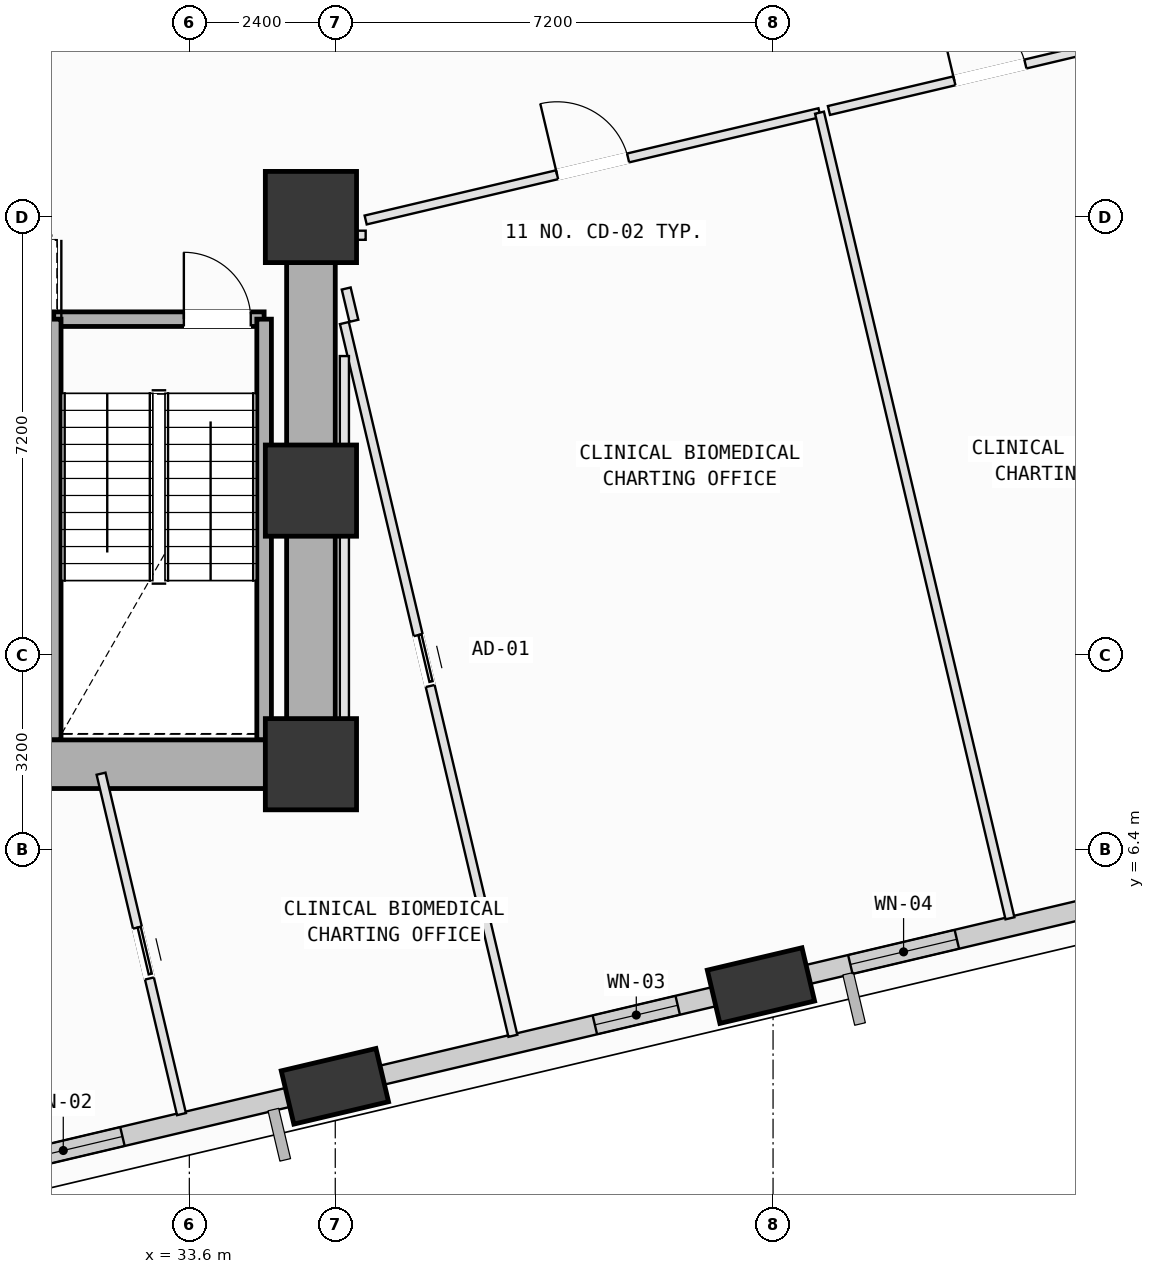
"""IFC4 building model, lengths in metres.
Left out: names, types, materials, properties, quantities, classifications, styles, units other than length and angle.
Written with IfcOpenShell. Run it as: python <this file> out.ifc"""

import sys

from ifc_helpers import new_model, si_unit, direction, frame, frame_2d, origin, origin_2d, place, context, subcontext, project, spatial, rectangle, extrude, element, fill, save


model = new_model("IFC4")
c1 = context("Model", 3, precision=1e-05, world=origin(), true_north=direction((0.0, 1.0)))
c2 = subcontext(c1, "Body", "Model", "MODEL_VIEW")
j1 = project(units=[si_unit("LENGTHUNIT", "METRE"), si_unit("PLANEANGLEUNIT", "RADIAN")], contexts=[c1])
p1 = place(None, origin())
s1 = spatial("IfcSite", under=j1, at=p1, CompositionType="ELEMENT")
p2 = place(p1, origin())
s2 = spatial("IfcBuilding", under=s1, at=p2, CompositionType="ELEMENT")
p3 = place(p2, frame((0.0, 0.0, 79.0)))
s3 = spatial("IfcBuildingStorey", under=s2, at=p3, CompositionType="ELEMENT", Elevation=79.0)
for number, where, z_axis, x_axis in (
    (1, (35.6, 7.8, 0.0), (0.0, 0.0, 1.0), (1.0, 0.0, 0.0)),
    (2, (35.6, 12.3, 0.0), (0.0, 0.0, 1.0), (1.0, 0.0, 0.0)),
    (3, (35.6, 16.8, 0.0), (0.0, 0.0, 1.0), (1.0, 0.0, 0.0)),
):
    element("IfcColumn", number, at=place(p3, frame(where, z_axis=z_axis, x_axis=x_axis)), inside=s3, PredefinedType="COLUMN", context=c2, shape_type="SweptSolid", body=[
        extrude(rectangle(XDim=1.5, YDim=1.5, at=origin_2d()), origin(), (0.0, 0.0, 1.0), 4.0),
    ])
p4 = place(p3, frame((35.994, 2.503, 0.002), z_axis=(0.091910802022, 0.010616963027, 0.995710642992), x_axis=(-0.339222831521, 0.940465222119, 0.021284655504)))
e4 = element("IfcColumn", 4, at=p4, inside=s3, PredefinedType="COLUMN", context=c2, shape_type="SweptSolid", body=[
    extrude(rectangle(XDim=1.6, YDim=0.9, at=origin_2d()), origin(), (0.0, 0.0, 1.0), 3.955),
])
p5 = place(p3, frame((43.001, 4.159, 0.002), z_axis=(0.084881179717, 0.039446599156, 0.995609939256), x_axis=(-0.617843296681, 0.786006368536, 0.021532518815)))
e5 = element("IfcColumn", 5, at=p5, inside=s3, PredefinedType="COLUMN", context=c2, shape_type="SweptSolid", body=[
    extrude(rectangle(XDim=1.6, YDim=0.9, at=origin_2d()), origin(), (0.0, 0.0, 1.0), 3.955),
])
p6 = place(p3, frame((35.582, 2.406, 0.0), z_axis=(0.0, 0.0, 1.0), x_axis=(-0.973170177917, -0.23008651593, 0.0)))
e6 = element("IfcWall", 6, at=p6, inside=s3, PredefinedType="SOLIDWALL", context=c2, shape_type="SweptSolid", body=[
    extrude(rectangle(XDim=5.99, YDim=0.32, at=frame_2d((2.995, 0.0))), origin(), (0.0, 0.0, 1.0), 3.085),
])
p7 = place(p6, frame((3.167, 0.0, 0.75)))
e7 = element("IfcOpeningElement", 7, at=p7, cuts=e6, PredefinedType="OPENING", context=c2, shape_type="SweptSolid", body=[
    extrude(rectangle(XDim=2.0, YDim=1.95, at=frame_2d((1.0, 0.975))), frame((0.0, 0.17, 0.0), z_axis=(0.0, -1.0, 0.0), x_axis=(1.0, 0.0, 0.0)), (0.0, 0.0, 1.0), 0.34),
])
p8 = place(p3, frame((42.589, 4.062, 0.0), z_axis=(0.0, 0.0, 1.0), x_axis=(-0.973176975218, -0.230057764281, 0.0)))
e8 = element("IfcWall", 8, at=p8, inside=s3, PredefinedType="SOLIDWALL", context=c2, shape_type="SweptSolid", body=[
    extrude(rectangle(XDim=5.985, YDim=0.32, at=frame_2d((2.993, 0.0))), origin(), (0.0, 0.0, 1.0), 3.085),
])
p9 = place(p8, frame((0.984, 0.0, 0.75)))
e9 = element("IfcOpeningElement", 9, at=p9, cuts=e8, PredefinedType="OPENING", context=c2, shape_type="SweptSolid", body=[
    extrude(rectangle(XDim=1.4, YDim=1.85, at=frame_2d((0.7, 0.925))), frame((0.0, 0.17, 0.0), z_axis=(0.0, -1.0, 0.0), x_axis=(1.0, 0.0, 0.0)), (0.0, 0.0, 1.0), 0.34),
])
p10 = place(p3, frame((49.602, 5.719, 0.0), z_axis=(0.0, 0.0, 1.0), x_axis=(-0.973177813983, -0.230054216157, 0.0)))
e10 = element("IfcWall", 10, at=p10, inside=s3, PredefinedType="SOLIDWALL", context=c2, shape_type="SweptSolid", body=[
    extrude(rectangle(XDim=5.993, YDim=0.32, at=frame_2d((2.996, 0.0))), origin(), (0.0, 0.0, 1.0), 3.085),
])
p11 = place(p10, frame((3.473, 0.0, 0.75)))
e11 = element("IfcOpeningElement", 11, at=p11, cuts=e10, PredefinedType="OPENING", context=c2, shape_type="SweptSolid", body=[
    extrude(rectangle(XDim=1.8, YDim=2.05, at=frame_2d((0.9, 1.025))), frame((0.0, 0.17, 0.0), z_axis=(0.0, -1.0, 0.0), x_axis=(1.0, 0.0, 0.0)), (0.0, 0.0, 1.0), 0.34),
])
p12 = place(p3, frame((31.37, 15.12, 0.0), z_axis=(0.0, 0.0, 1.0), x_axis=(1.0, 0.0, 0.0)))
e12 = element("IfcWall", 12, at=p12, inside=s3, PredefinedType="SOLIDWALL", context=c2, shape_type="SweptSolid", body=[
    extrude(rectangle(XDim=3.46, YDim=0.24, at=frame_2d((1.73, 0.0))), origin(), (0.0, 0.0, 1.0), 3.7),
])
p13 = place(p12, frame((2.14, 0.0, 0.0)))
e13 = element("IfcOpeningElement", 13, at=p13, cuts=e12, PredefinedType="OPENING", context=c2, shape_type="SweptSolid", body=[
    extrude(rectangle(XDim=1.1, YDim=2.15, at=frame_2d((0.55, 1.075))), frame((0.0, 0.13, 0.0), z_axis=(0.0, -1.0, 0.0), x_axis=(1.0, 0.0, 0.0)), (0.0, 0.0, 1.0), 0.26),
])
for number, where, z_axis, x_axis in (
    (14, (34.83, 15.12, 0.0), (0.0, 0.0, 1.0), (0.0, -1.0, 0.0)),
    (15, (31.37, 8.2, 0.0), (0.0, 0.0, 1.0), (0.0, 1.0, 0.0)),
):
    element("IfcWall", number, at=place(p3, frame(where, z_axis=z_axis, x_axis=x_axis)), inside=s3, PredefinedType="SOLIDWALL", context=c2, shape_type="SweptSolid", body=[
        extrude(rectangle(XDim=6.92, YDim=0.24, at=frame_2d((3.46, 0.0))), origin(), (0.0, 0.0, 1.0), 3.7),
    ])
p14 = place(p3, frame((24.8, 7.8, 0.0), z_axis=(0.0, 0.0, 1.0), x_axis=(1.0, 0.0, 0.0)))
e16 = element("IfcWall", 16, at=p14, inside=s3, PredefinedType="SHEAR", context=c2, shape_type="SweptSolid", body=[
    extrude(rectangle(XDim=10.8, YDim=0.8, at=frame_2d((5.4, 0.0))), origin(), (0.0, 0.0, 1.0), 3.7),
])
p15 = place(p3, frame((35.6, 7.8, 0.0), z_axis=(0.0, 0.0, 1.0), x_axis=(0.0, 1.0, 0.0)))
e17 = element("IfcWall", 17, at=p15, inside=s3, PredefinedType="SHEAR", context=c2, shape_type="SweptSolid", body=[
    extrude(rectangle(XDim=9.0, YDim=0.8, at=frame_2d((4.5, 0.0))), origin(), (0.0, 0.0, 1.0), 3.7),
])
p16 = place(p3, frame((32.148, 7.644, 0.0), z_axis=(0.0, 0.0, 1.0), x_axis=(0.22995457353, -0.9732013636, 0.0)))
e18 = element("IfcWall", 18, at=p16, inside=s3, PredefinedType="PARTITIONING", context=c2, shape_type="SweptSolid", body=[
    extrude(rectangle(XDim=5.753, YDim=0.15, at=frame_2d((2.877, 0.0))), origin(), (0.0, 0.0, 1.0), 3.7),
])
p17 = place(p16, frame((2.601, 0.0, 0.0)))
e19 = element("IfcOpeningElement", 19, at=p17, cuts=e18, PredefinedType="OPENING", context=c2, shape_type="SweptSolid", body=[
    extrude(rectangle(XDim=0.86, YDim=2.06, at=frame_2d((0.43, 1.03))), frame((0.0, 0.085, 0.0), z_axis=(0.0, -1.0, 0.0), x_axis=(1.0, 0.0, 0.0)), (0.0, 0.0, 1.0), 0.17),
])
p18 = place(p3, frame((36.15, 15.056, 0.0), z_axis=(0.0, 0.0, 1.0), x_axis=(0.230035574951, -0.973182220479, 0.0)))
e20 = element("IfcWall", 20, at=p18, inside=s3, PredefinedType="PARTITIONING", context=c2, shape_type="SweptSolid", body=[
    extrude(rectangle(XDim=12.046, YDim=0.15, at=frame_2d((6.023, 0.0))), origin(), (0.0, 0.0, 1.0), 3.7),
])
p19 = place(p18, frame((5.274, 0.0, 0.0)))
e21 = element("IfcOpeningElement", 21, at=p19, cuts=e20, PredefinedType="OPENING", context=c2, shape_type="SweptSolid", body=[
    extrude(rectangle(XDim=0.86, YDim=2.06, at=frame_2d((0.43, 1.03))), frame((0.0, 0.085, 0.0), z_axis=(0.0, -1.0, 0.0), x_axis=(1.0, 0.0, 0.0)), (0.0, 0.0, 1.0), 0.17),
])
p20 = place(p3, frame((36.818, 2.461, 0.0), z_axis=(0.0, 0.0, 1.0), x_axis=(-0.973293226806, -0.229565447429, 0.0)))
e22 = element("IfcWall", 22, at=p20, inside=s3, PredefinedType="PARTITIONING", context=c2, shape_type="SweptSolid", body=[
    extrude(rectangle(XDim=1.216, YDim=0.15, at=frame_2d((0.608, 0.0))), origin(), (0.0, 0.0, 1.0), 3.085),
])
p21 = place(p3, frame((36.15, 7.5, 0.0), z_axis=(0.0, 0.0, 1.0), x_axis=(0.0, 1.0, 0.0)))
e23 = element("IfcWall", 23, at=p21, inside=s3, PredefinedType="PARTITIONING", context=c2, shape_type="SweptSolid", body=[
    extrude(rectangle(XDim=7.013, YDim=0.15, at=frame_2d((3.506, 0.0))), origin(), (0.0, 0.0, 1.0), 3.7),
])
p22 = place(p3, frame((36.5, 16.751, 0.0), z_axis=(0.0, 0.0, 1.0), x_axis=(0.973158565996, 0.230135623987, 0.0)))
e24 = element("IfcWall", 24, at=p22, inside=s3, PredefinedType="PARTITIONING", context=c2, shape_type="SweptSolid", body=[
    extrude(rectangle(XDim=7.67, YDim=0.15, at=frame_2d((3.835, 0.0))), origin(), (0.0, 0.0, 1.0), 3.7),
])
p23 = place(p22, frame((3.235, 0.0, 0.0)))
e25 = element("IfcOpeningElement", 25, at=p23, cuts=e24, PredefinedType="OPENING", context=c2, shape_type="SweptSolid", body=[
    extrude(rectangle(XDim=1.2, YDim=2.15, at=frame_2d((0.6, 1.075))), frame((0.0, 0.085, 0.0), z_axis=(0.0, -1.0, 0.0), x_axis=(1.0, 0.0, 0.0)), (0.0, 0.0, 1.0), 0.17),
])
p24 = place(p3, frame((43.964, 18.516, 0.0), z_axis=(0.0, 0.0, 1.0), x_axis=(0.230026689043, -0.97318432084, 0.0)))
e26 = element("IfcWall", 26, at=p24, inside=s3, PredefinedType="PARTITIONING", context=c2, shape_type="SweptSolid", body=[
    extrude(rectangle(XDim=13.615, YDim=0.15, at=frame_2d((6.808, 0.0))), origin(), (0.0, 0.0, 1.0), 3.7),
])
p25 = place(p3, frame((43.823, 4.117, 0.0), z_axis=(0.0, 0.0, 1.0), x_axis=(-0.973197713675, -0.229970019998, 0.0)))
e27 = element("IfcWall", 27, at=p25, inside=s3, PredefinedType="PARTITIONING", context=c2, shape_type="SweptSolid", body=[
    extrude(rectangle(XDim=1.213, YDim=0.15, at=frame_2d((0.607, 0.0))), origin(), (0.0, 0.0, 1.0), 3.085),
])
p26 = place(p3, frame((36.306, 15.093, 0.0), z_axis=(0.0, 0.0, 1.0), x_axis=(-0.230834223704, 0.9729930941, 0.0)))
e28 = element("IfcWall", 28, at=p26, inside=s3, PredefinedType="PARTITIONING", context=c2, shape_type="SweptSolid", body=[
    extrude(rectangle(XDim=0.546, YDim=0.15, at=frame_2d((0.273, 0.0))), origin(), (0.0, 0.0, 1.0), 3.7),
])
p27 = place(p3, frame((35.973, 16.5, 0.0), z_axis=(0.0, 0.0, 1.0), x_axis=(1.0, 0.0, 0.0)))
e29 = element("IfcWall", 29, at=p27, inside=s3, PredefinedType="PARTITIONING", context=c2, shape_type="SweptSolid", body=[
    extrude(rectangle(XDim=0.527, YDim=0.15, at=frame_2d((0.264, 0.0))), origin(), (0.0, 0.0, 1.0), 3.7),
])
p28 = place(p3, frame((44.119, 18.552, 0.0), z_axis=(0.0, 0.0, 1.0), x_axis=(0.973159948665, 0.230129777116, 0.0)))
e30 = element("IfcWall", 30, at=p28, inside=s3, PredefinedType="PARTITIONING", context=c2, shape_type="SweptSolid", body=[
    extrude(rectangle(XDim=5.44, YDim=0.15, at=frame_2d((2.72, 0.0))), origin(), (0.0, 0.0, 1.0), 3.7),
])
p29 = place(p28, frame((2.12, 0.0, 0.0)))
e31 = element("IfcOpeningElement", 31, at=p29, cuts=e30, PredefinedType="OPENING", context=c2, shape_type="SweptSolid", body=[
    extrude(rectangle(XDim=1.2, YDim=2.15, at=frame_2d((0.6, 1.075))), frame((0.0, 0.085, 0.0), z_axis=(0.0, -1.0, 0.0), x_axis=(1.0, 0.0, 0.0)), (0.0, 0.0, 1.0), 0.17),
])
p30 = place(p7, origin())
e32 = element("IfcWindow", 32, at=p30, inside=s3, PartitioningType="SINGLE_PANEL", PredefinedType="WINDOW", context=c2, shape_type="SweptSolid", body=[
    extrude(rectangle(XDim=2.0, YDim=1.95, at=frame_2d((1.0, 0.975))), frame((0.0, 0.03, 0.0), z_axis=(0.0, -1.0, 0.0), x_axis=(1.0, 0.0, 0.0)), (0.0, 0.0, 1.0), 0.06),
])
fill(e7, e32)
p31 = place(p9, origin())
e33 = element("IfcWindow", 33, at=p31, inside=s3, PartitioningType="SINGLE_PANEL", PredefinedType="WINDOW", context=c2, shape_type="SweptSolid", body=[
    extrude(rectangle(XDim=1.4, YDim=1.85, at=frame_2d((0.7, 0.925))), frame((0.0, 0.03, 0.0), z_axis=(0.0, -1.0, 0.0), x_axis=(1.0, 0.0, 0.0)), (0.0, 0.0, 1.0), 0.06),
])
fill(e9, e33)
p32 = place(p11, origin())
e34 = element("IfcWindow", 34, at=p32, inside=s3, PartitioningType="SINGLE_PANEL", PredefinedType="WINDOW", context=c2, shape_type="SweptSolid", body=[
    extrude(rectangle(XDim=1.8, YDim=2.05, at=frame_2d((0.9, 1.025))), frame((0.0, 0.03, 0.0), z_axis=(0.0, -1.0, 0.0), x_axis=(1.0, 0.0, 0.0)), (0.0, 0.0, 1.0), 0.06),
])
fill(e11, e34)
p33 = place(p13, origin())
e35 = element("IfcDoor", 35, at=p33, inside=s3, OperationType="SINGLE_SWING_LEFT", PredefinedType="DOOR", context=c2, shape_type="SweptSolid", body=[
    extrude(rectangle(XDim=1.1, YDim=2.15, at=frame_2d((0.55, 1.075))), frame((0.0, 0.025, 0.0), z_axis=(0.0, -1.0, 0.0), x_axis=(1.0, 0.0, 0.0)), (0.0, 0.0, 1.0), 0.05),
])
fill(e13, e35)
p34 = place(p23, origin())
e36 = element("IfcDoor", 36, at=p34, inside=s3, OperationType="SINGLE_SWING_LEFT", PredefinedType="DOOR", context=c2, shape_type="SweptSolid", body=[
    extrude(rectangle(XDim=1.2, YDim=2.15, at=frame_2d((0.6, 1.075))), frame((0.0, 0.025, 0.0), z_axis=(0.0, -1.0, 0.0), x_axis=(1.0, 0.0, 0.0)), (0.0, 0.0, 1.0), 0.05),
])
fill(e25, e36)
p35 = place(p29, origin())
e37 = element("IfcDoor", 37, at=p35, inside=s3, OperationType="SINGLE_SWING_LEFT", PredefinedType="DOOR", context=c2, shape_type="SweptSolid", body=[
    extrude(rectangle(XDim=1.2, YDim=2.15, at=frame_2d((0.6, 1.075))), frame((0.0, 0.025, 0.0), z_axis=(0.0, -1.0, 0.0), x_axis=(1.0, 0.0, 0.0)), (0.0, 0.0, 1.0), 0.05),
])
fill(e31, e37)
p36 = place(p19, origin())
e38 = element("IfcDoor", 38, at=p36, inside=s3, OperationType="SLIDING_TO_LEFT", PredefinedType="DOOR", context=c2, shape_type="SweptSolid", body=[
    extrude(rectangle(XDim=0.86, YDim=2.06, at=frame_2d((0.43, 1.03))), frame((0.0, 0.025, 0.0), z_axis=(0.0, -1.0, 0.0), x_axis=(1.0, 0.0, 0.0)), (0.0, 0.0, 1.0), 0.05),
])
fill(e21, e38)
p37 = place(p17, origin())
e39 = element("IfcDoor", 39, at=p37, inside=s3, OperationType="SLIDING_TO_LEFT", PredefinedType="DOOR", context=c2, shape_type="SweptSolid", body=[
    extrude(rectangle(XDim=0.86, YDim=2.06, at=frame_2d((0.43, 1.03))), frame((0.0, 0.025, 0.0), z_axis=(0.0, -1.0, 0.0), x_axis=(1.0, 0.0, 0.0)), (0.0, 0.0, 1.0), 0.05),
])
fill(e19, e39)
save(model, sys.argv[1])
